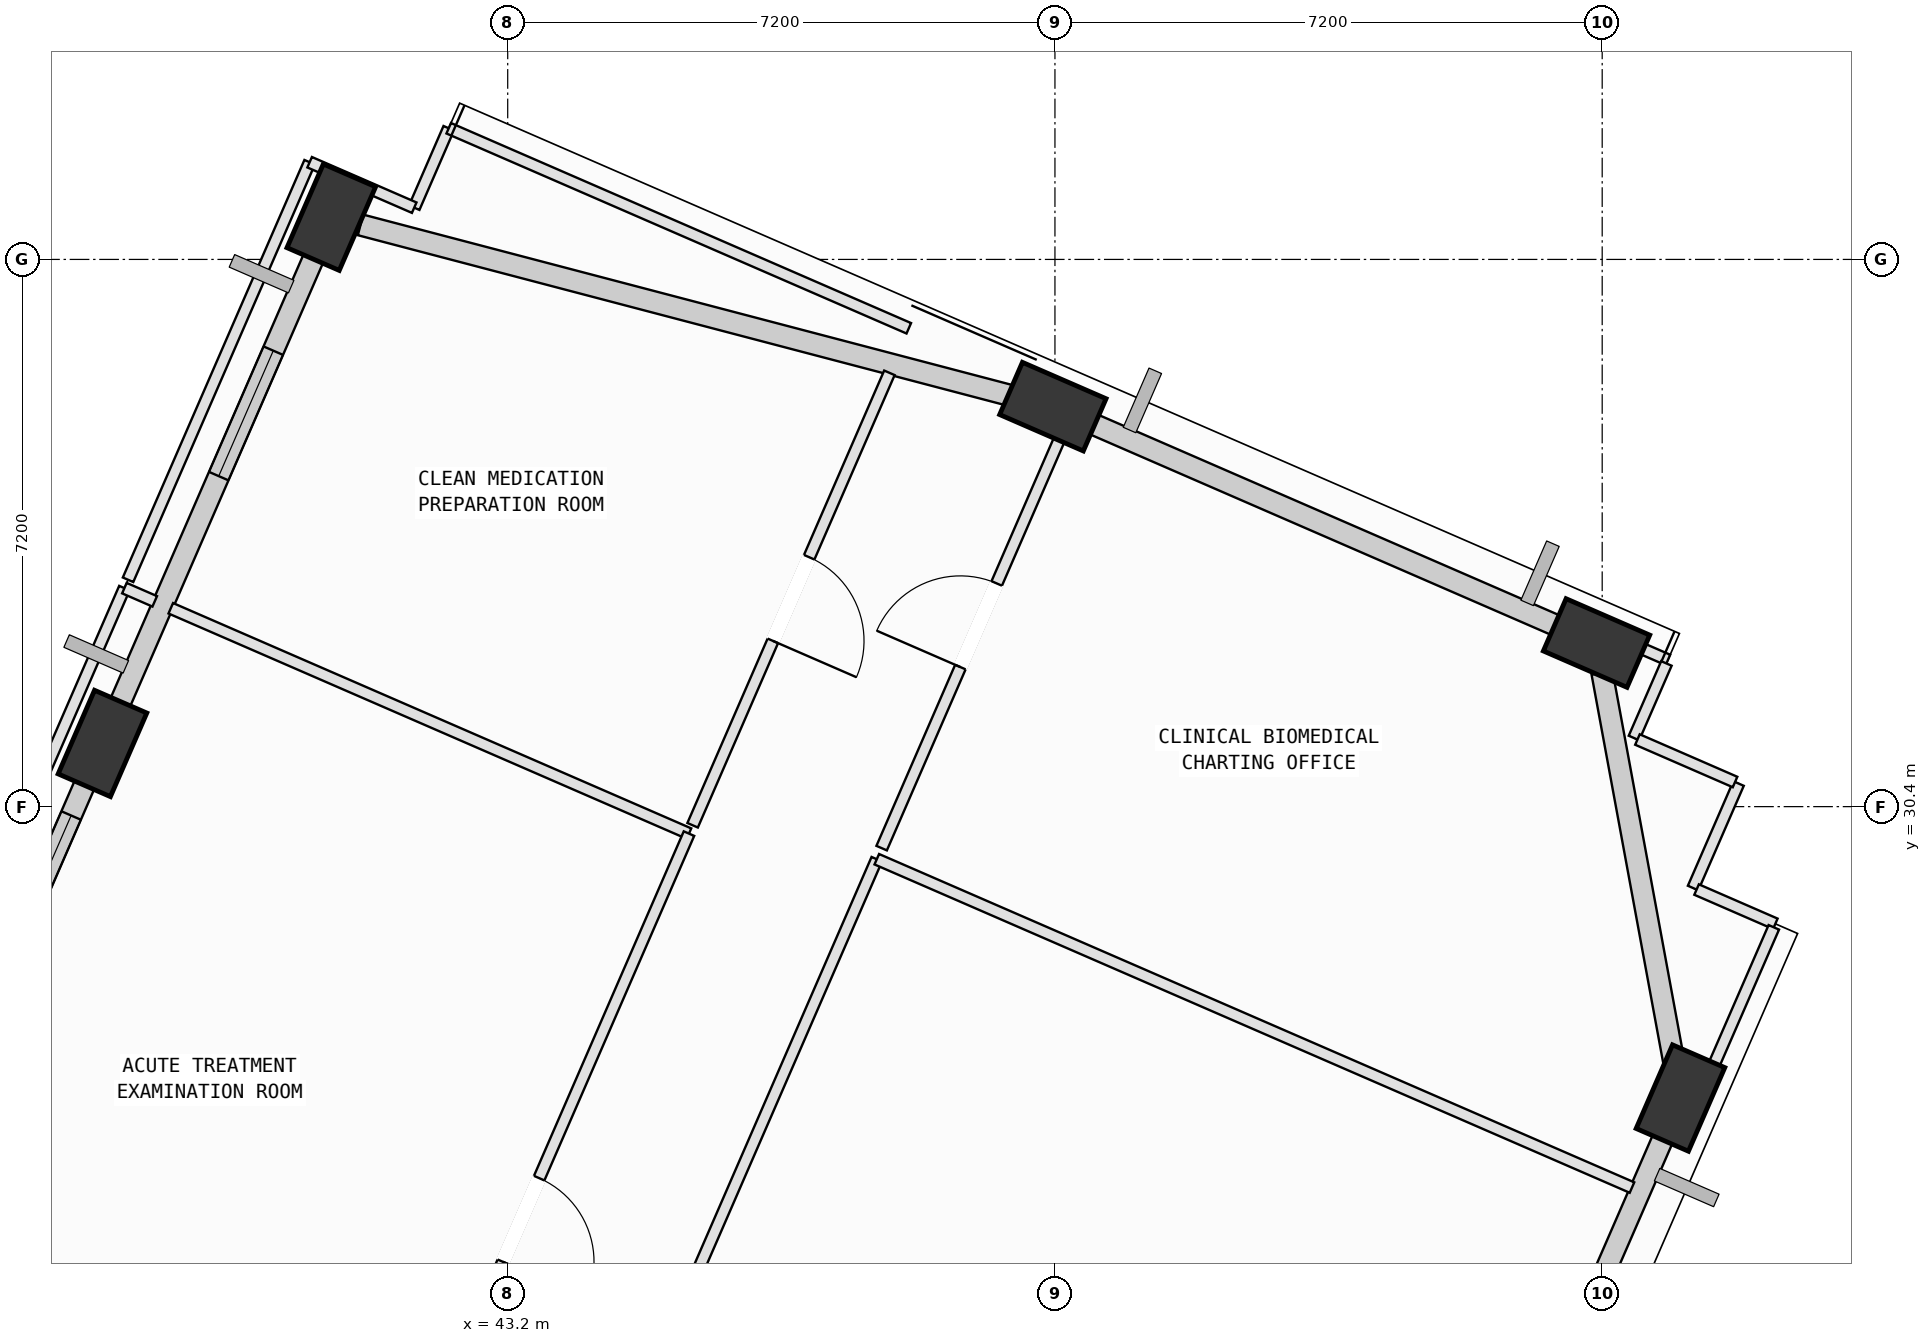
"""IFC4 building model, lengths in metres.
Left out: names, types, materials, properties, quantities, classifications, styles, units other than length and angle.
Written with IfcOpenShell. Run it as: python <this file> out.ifc"""

import sys

from ifc_helpers import new_model, si_unit, direction, frame, frame_2d, origin, origin_2d, place, context, subcontext, project, spatial, rectangle, extrude, element, fill, save


model = new_model("IFC4")
c1 = context("Model", 3, precision=1e-05, world=origin(), true_north=direction((0.0, 1.0)))
c2 = subcontext(c1, "Body", "Model", "MODEL_VIEW")
j1 = project(units=[si_unit("LENGTHUNIT", "METRE"), si_unit("PLANEANGLEUNIT", "RADIAN")], contexts=[c1])
p1 = place(None, origin())
s1 = spatial("IfcSite", under=j1, at=p1, CompositionType="ELEMENT")
p2 = place(p1, origin())
s2 = spatial("IfcBuilding", under=s1, at=p2, CompositionType="ELEMENT")
p3 = place(p2, frame((0.0, 0.0, 308.6)))
s3 = spatial("IfcBuildingStorey", under=s2, at=p3, CompositionType="ELEMENT", Elevation=308.6)
for number, where, z_axis, x_axis in (
    (1, (58.63, 26.566, 0.002), (0.0, 0.0, 1.0), (0.399, 0.917, 0.0)),
    (2, (57.526, 32.553, 0.002), (0.0, 0.0, 1.0), (-0.917, 0.399, 0.0)),
    (3, (50.373, 35.663, 0.002), (0.0, 0.0, 1.0), (-0.917, 0.399, 0.0)),
    (4, (40.879, 38.155, 0.002), (0.0, 0.0, 1.0), (0.399, 0.917, 0.0)),
    (5, (37.868, 31.231, 0.002), (0.0, 0.0, 1.0), (0.399, 0.917, 0.0)),
):
    element("IfcColumn", number, at=place(p3, frame(where, z_axis=z_axis, x_axis=x_axis)), inside=s3, PredefinedType="COLUMN", context=c2, shape_type="SweptSolid", body=[
        extrude(rectangle(XDim=1.2, YDim=0.75, at=origin_2d()), origin(), (0.0, 0.0, 1.0), 3.996),
    ])
p4 = place(p3, frame((58.472, 26.201, 0.0), z_axis=(0.0, 0.0, 1.0), x_axis=(-0.398776286617, -0.917048239316, 0.0)))
e6 = element("IfcWall", 6, at=p4, inside=s3, PredefinedType="SOLIDWALL", context=c2, shape_type="SweptSolid", body=[
    extrude(rectangle(XDim=6.405, YDim=0.28, at=frame_2d((3.203, 0.0))), origin(), (0.0, 0.0, 1.0), 3.265),
])
p5 = place(p4, frame((3.176, 0.0, 0.75)))
e7 = element("IfcOpeningElement", 7, at=p5, cuts=e6, PredefinedType="OPENING", context=c2, shape_type="SweptSolid", body=[
    extrude(rectangle(XDim=1.2, YDim=1.75, at=frame_2d((0.6, 0.875))), frame((0.0, 0.15, 0.0), z_axis=(0.0, -1.0, 0.0), x_axis=(1.0, 0.0, 0.0)), (0.0, 0.0, 1.0), 0.3),
])
p6 = place(p3, frame((57.598, 32.162, 0.0), z_axis=(0.0, 0.0, 1.0), x_axis=(0.181421889976, -0.983405357845, 0.0)))
e8 = element("IfcWall", 8, at=p6, inside=s3, PredefinedType="SOLIDWALL", context=c2, shape_type="SweptSolid", body=[
    extrude(rectangle(XDim=5.293, YDim=0.28, at=frame_2d((2.646, 0.0))), origin(), (0.0, 0.0, 1.0), 3.265),
])
p7 = place(p3, frame((50.737, 35.504, 0.0), z_axis=(0.0, 0.0, 1.0), x_axis=(0.917057311373, -0.398755423359, 0.0)))
e9 = element("IfcWall", 9, at=p7, inside=s3, PredefinedType="SOLIDWALL", context=c2, shape_type="SweptSolid", body=[
    extrude(rectangle(XDim=7.005, YDim=0.28, at=frame_2d((3.502, 0.0))), origin(), (0.0, 0.0, 1.0), 3.265),
])
p8 = place(p3, frame((41.264, 38.054, 0.0), z_axis=(0.0, 0.0, 1.0), x_axis=(0.967228971308, -0.253905724755, 0.0)))
e10 = element("IfcWall", 10, at=p8, inside=s3, PredefinedType="SOLIDWALL", context=c2, shape_type="SweptSolid", body=[
    extrude(rectangle(XDim=9.02, YDim=0.28, at=frame_2d((4.51, 0.0))), origin(), (0.0, 0.0, 1.0), 3.265),
])
p9 = place(p3, frame((38.027, 31.596, 0.0), z_axis=(0.0, 0.0, 1.0), x_axis=(0.398764437463, 0.917053391802, 0.0)))
e11 = element("IfcWall", 11, at=p9, inside=s3, PredefinedType="SOLIDWALL", context=c2, shape_type="SweptSolid", body=[
    extrude(rectangle(XDim=6.755, YDim=0.28, at=frame_2d((3.377, 0.0))), origin(), (0.0, 0.0, 1.0), 3.265),
])
p10 = place(p9, frame((3.438, 0.0, 0.75)))
e12 = element("IfcOpeningElement", 12, at=p10, cuts=e11, PredefinedType="OPENING", context=c2, shape_type="SweptSolid", body=[
    extrude(rectangle(XDim=1.8, YDim=2.05, at=frame_2d((0.9, 1.025))), frame((0.0, 0.15, 0.0), z_axis=(0.0, -1.0, 0.0), x_axis=(1.0, 0.0, 0.0)), (0.0, 0.0, 1.0), 0.3),
])
p11 = place(p3, frame((35.156, 24.993, 0.0), z_axis=(0.0, 0.0, 1.0), x_axis=(0.398758169539, 0.917056117272, 0.0)))
e13 = element("IfcWall", 13, at=p11, inside=s3, PredefinedType="SOLIDWALL", context=c2, shape_type="SweptSolid", body=[
    extrude(rectangle(XDim=6.405, YDim=0.28, at=frame_2d((3.202, 0.0))), origin(), (0.0, 0.0, 1.0), 3.265),
])
p12 = place(p11, frame((2.602, 0.0, 0.75)))
e14 = element("IfcOpeningElement", 14, at=p12, cuts=e13, PredefinedType="OPENING", context=c2, shape_type="SweptSolid", body=[
    extrude(rectangle(XDim=1.2, YDim=1.75, at=frame_2d((0.6, 0.875))), frame((0.0, 0.15, 0.0), z_axis=(0.0, -1.0, 0.0), x_axis=(1.0, 0.0, 0.0)), (0.0, 0.0, 1.0), 0.3),
])
p13 = place(p11, frame((4.569, 0.0, 0.75)))
e15 = element("IfcOpeningElement", 15, at=p13, cuts=e13, PredefinedType="OPENING", context=c2, shape_type="SweptSolid", body=[
    extrude(rectangle(XDim=1.2, YDim=1.75, at=frame_2d((0.6, 0.875))), frame((0.0, 0.15, 0.0), z_axis=(0.0, -1.0, 0.0), x_axis=(1.0, 0.0, 0.0)), (0.0, 0.0, 1.0), 0.3),
])
p14 = place(p3, frame((42.856, 17.749, 0.0), z_axis=(0.0, 0.0, 1.0), x_axis=(0.398751440491, 0.917059043195, 0.0)))
e16 = element("IfcWall", 16, at=p14, inside=s3, PredefinedType="PARTITIONING", context=c2, shape_type="SweptSolid", body=[
    extrude(rectangle(XDim=13.041, YDim=0.15, at=frame_2d((6.52, 0.0))), origin(), (0.0, 0.0, 1.0), 3.78),
])
p15 = place(p14, frame((5.92, 0.0, 0.0)))
e17 = element("IfcOpeningElement", 17, at=p15, cuts=e16, PredefinedType="OPENING", context=c2, shape_type="SweptSolid", body=[
    extrude(rectangle(XDim=1.2, YDim=2.15, at=frame_2d((0.6, 1.075))), frame((0.0, 0.085, 0.0), z_axis=(0.0, -1.0, 0.0), x_axis=(1.0, 0.0, 0.0)), (0.0, 0.0, 1.0), 0.17),
])
p16 = place(p3, frame((48.056, 29.708, 0.0), z_axis=(0.0, 0.0, 1.0), x_axis=(0.917068265028, -0.398730231207, 0.0)))
e18 = element("IfcWall", 18, at=p16, inside=s3, PredefinedType="PARTITIONING", context=c2, shape_type="SweptSolid", body=[
    extrude(rectangle(XDim=10.834, YDim=0.15, at=frame_2d((5.417, 0.0))), origin(), (0.0, 0.0, 1.0), 3.78),
])
p17 = place(p3, frame((59.394, 30.704, 0.0), z_axis=(0.0, 0.0, 1.0), x_axis=(-0.398904712107, -0.916992383097, 0.0)))
e19 = element("IfcWall", 19, at=p17, inside=s3, PredefinedType="PARTITIONING", context=c2, shape_type="SweptSolid", body=[
    extrude(rectangle(XDim=1.5, YDim=0.15, at=frame_2d((0.75, 0.0))), origin(), (0.0, 0.0, 1.0), 3.78),
])
p18 = place(p3, frame((58.842, 29.309, 0.0), z_axis=(0.0, 0.0, 1.0), x_axis=(0.916815661373, -0.399310709926, 0.0)))
e20 = element("IfcWall", 20, at=p18, inside=s3, PredefinedType="PARTITIONING", context=c2, shape_type="SweptSolid", body=[
    extrude(rectangle(XDim=1.13, YDim=0.15, at=frame_2d((0.565, 0.0))), origin(), (0.0, 0.0, 1.0), 3.78),
])
p19 = place(p3, frame((59.858, 28.812, 0.0), z_axis=(0.0, 0.0, 1.0), x_axis=(-0.399092651862, -0.916910603728, 0.0)))
e21 = element("IfcWall", 21, at=p19, inside=s3, PredefinedType="PARTITIONING", context=c2, shape_type="SweptSolid", body=[
    extrude(rectangle(XDim=2.947, YDim=0.15, at=frame_2d((1.473, 0.0))), origin(), (0.0, 0.0, 1.0), 3.265),
])
p20 = place(p3, frame((48.12, 29.854, 0.0), z_axis=(0.0, 0.0, 1.0), x_axis=(0.398700984872, 0.917080980428, 0.0)))
e22 = element("IfcWall", 22, at=p20, inside=s3, PredefinedType="PARTITIONING", context=c2, shape_type="SweptSolid", body=[
    extrude(rectangle(XDim=6.395, YDim=0.15, at=frame_2d((3.198, 0.0))), origin(), (0.0, 0.0, 1.0), 2.765),
])
p21 = place(p20, frame((2.598, 0.0, 0.0)))
e23 = element("IfcOpeningElement", 23, at=p21, cuts=e22, PredefinedType="OPENING", context=c2, shape_type="SweptSolid", body=[
    extrude(rectangle(XDim=1.2, YDim=2.15, at=frame_2d((0.6, 1.075))), frame((0.0, 0.085, 0.0), z_axis=(0.0, -1.0, 0.0), x_axis=(1.0, 0.0, 0.0)), (0.0, 0.0, 1.0), 0.17),
])
p22 = place(p3, frame((57.229, 32.867, 0.0), z_axis=(0.0, 0.0, 1.0), x_axis=(0.917222637379, -0.398374991032, 0.0)))
e24 = element("IfcWall", 24, at=p22, inside=s3, PredefinedType="PARTITIONING", context=c2, shape_type="SweptSolid", body=[
    extrude(rectangle(XDim=1.348, YDim=0.15, at=frame_2d((0.674, 0.0))), origin(), (0.0, 0.0, 1.0), 3.265),
])
p23 = place(p3, frame((58.445, 32.284, 0.0), z_axis=(0.0, 0.0, 1.0), x_axis=(-0.39911825621, -0.916899458807, 0.0)))
e25 = element("IfcWall", 25, at=p23, inside=s3, PredefinedType="PARTITIONING", context=c2, shape_type="SweptSolid", body=[
    extrude(rectangle(XDim=1.07, YDim=0.15, at=frame_2d((0.535, 0.0))), origin(), (0.0, 0.0, 1.0), 3.78),
])
p24 = place(p3, frame((58.064, 31.283, 0.0), z_axis=(0.0, 0.0, 1.0), x_axis=(0.91691198731, -0.399089473085, 0.0)))
e26 = element("IfcWall", 26, at=p24, inside=s3, PredefinedType="PARTITIONING", context=c2, shape_type="SweptSolid", body=[
    extrude(rectangle(XDim=1.4, YDim=0.15, at=frame_2d((0.7, 0.0))), origin(), (0.0, 0.0, 1.0), 3.78),
])
p25 = place(p3, frame((33.736, 23.108, 0.0), z_axis=(0.0, 0.0, 1.0), x_axis=(0.398761541239, 0.917054651168, 0.0)))
e27 = element("IfcWall", 27, at=p25, inside=s3, PredefinedType="PARTITIONING", context=c2, shape_type="SweptSolid", body=[
    extrude(rectangle(XDim=11.087, YDim=0.15, at=frame_2d((5.543, 0.0))), origin(), (0.0, 0.0, 1.0), 3.78),
])
p26 = place(p3, frame((38.157, 33.275, 0.0), z_axis=(0.0, 0.0, 1.0), x_axis=(0.916748651636, -0.399464528742, 0.0)))
e28 = element("IfcWall", 28, at=p26, inside=s3, PredefinedType="PARTITIONING", context=c2, shape_type="SweptSolid", body=[
    extrude(rectangle(XDim=0.435, YDim=0.15, at=frame_2d((0.218, 0.0))), origin(), (0.0, 0.0, 1.0), 3.78),
])
p27 = place(p3, frame((38.767, 33.01, 0.0), z_axis=(0.0, 0.0, 1.0), x_axis=(0.917030896956, -0.398816165707, 0.0)))
e29 = element("IfcWall", 29, at=p27, inside=s3, PredefinedType="PARTITIONING", context=c2, shape_type="SweptSolid", body=[
    extrude(rectangle(XDim=7.435, YDim=0.15, at=frame_2d((3.717, 0.0))), origin(), (0.0, 0.0, 1.0), 3.78),
])
p28 = place(p3, frame((45.585, 30.045, 0.0), z_axis=(0.0, 0.0, 1.0), x_axis=(-0.398687458661, -0.91708686083, 0.0)))
e30 = element("IfcWall", 30, at=p28, inside=s3, PredefinedType="PARTITIONING", context=c2, shape_type="SweptSolid", body=[
    extrude(rectangle(XDim=11.086, YDim=0.15, at=frame_2d((5.543, 0.0))), origin(), (0.0, 0.0, 1.0), 2.765),
])
p29 = place(p28, frame((4.943, 0.0, 0.0)))
e31 = element("IfcOpeningElement", 31, at=p29, cuts=e30, PredefinedType="OPENING", context=c2, shape_type="SweptSolid", body=[
    extrude(rectangle(XDim=1.2, YDim=2.15, at=frame_2d((0.6, 1.075))), frame((0.0, 0.085, 0.0), z_axis=(0.0, -1.0, 0.0), x_axis=(1.0, 0.0, 0.0)), (0.0, 0.0, 1.0), 0.17),
])
p30 = place(p3, frame((41.97, 38.281, 0.0), z_axis=(0.0, 0.0, 1.0), x_axis=(0.398569395059, 0.917138177878, 0.0)))
e32 = element("IfcWall", 32, at=p30, inside=s3, PredefinedType="PARTITIONING", context=c2, shape_type="SweptSolid", body=[
    extrude(rectangle(XDim=1.139, YDim=0.15, at=frame_2d((0.57, 0.0))), origin(), (0.0, 0.0, 1.0), 3.78),
])
p31 = place(p3, frame((42.424, 39.326, 0.0), z_axis=(0.0, 0.0, 1.0), x_axis=(0.917064175576, -0.3987396367, 0.0)))
e33 = element("IfcWall", 33, at=p31, inside=s3, PredefinedType="PARTITIONING", context=c2, shape_type="SweptSolid", body=[
    extrude(rectangle(XDim=6.6, YDim=0.15, at=frame_2d((3.3, 0.0))), origin(), (0.0, 0.0, 1.0), 3.78),
])
p32 = place(p3, frame((48.222, 36.108, 0.0), z_axis=(0.0, 0.0, 1.0), x_axis=(-0.398811373886, -0.9170329809, 0.0)))
e34 = element("IfcWall", 34, at=p32, inside=s3, PredefinedType="PARTITIONING", context=c2, shape_type="SweptSolid", body=[
    extrude(rectangle(XDim=6.491, YDim=0.15, at=frame_2d((3.246, 0.0))), origin(), (0.0, 0.0, 1.0), 2.765),
])
p33 = place(p32, frame((2.646, 0.0, 0.0)))
e35 = element("IfcOpeningElement", 35, at=p33, cuts=e34, PredefinedType="OPENING", context=c2, shape_type="SweptSolid", body=[
    extrude(rectangle(XDim=1.2, YDim=2.15, at=frame_2d((0.6, 1.075))), frame((0.0, 0.085, 0.0), z_axis=(0.0, -1.0, 0.0), x_axis=(1.0, 0.0, 0.0)), (0.0, 0.0, 1.0), 0.17),
])
p34 = place(p3, frame((38.205, 33.385, 0.0), z_axis=(0.0, 0.0, 1.0), x_axis=(0.398763364975, 0.917053858153, 0.0)))
e36 = element("IfcWall", 36, at=p34, inside=s3, PredefinedType="PARTITIONING", context=c2, shape_type="SweptSolid", body=[
    extrude(rectangle(XDim=5.991, YDim=0.15, at=frame_2d((2.995, 0.0))), origin(), (0.0, 0.0, 1.0), 3.78),
])
p35 = place(p3, frame((40.594, 38.879, 0.0), z_axis=(0.0, 0.0, 1.0), x_axis=(0.91715541112, -0.398529737728, 0.0)))
e37 = element("IfcWall", 37, at=p35, inside=s3, PredefinedType="PARTITIONING", context=c2, shape_type="SweptSolid", body=[
    extrude(rectangle(XDim=1.5, YDim=0.15, at=frame_2d((0.75, 0.0))), origin(), (0.0, 0.0, 1.0), 3.265),
])
p36 = place(p10, origin())
e38 = element("IfcWindow", 38, at=p36, inside=s3, PartitioningType="SINGLE_PANEL", PredefinedType="WINDOW", context=c2, shape_type="SweptSolid", body=[
    extrude(rectangle(XDim=1.8, YDim=2.05, at=frame_2d((0.9, 1.025))), frame((0.0, 0.03, 0.0), z_axis=(0.0, -1.0, 0.0), x_axis=(1.0, 0.0, 0.0)), (0.0, 0.0, 1.0), 0.06),
])
fill(e12, e38)
p37 = place(p13, origin())
e39 = element("IfcWindow", 39, at=p37, inside=s3, PartitioningType="SINGLE_PANEL", PredefinedType="WINDOW", context=c2, shape_type="SweptSolid", body=[
    extrude(rectangle(XDim=1.2, YDim=1.75, at=frame_2d((0.6, 0.875))), frame((0.0, 0.03, 0.0), z_axis=(0.0, -1.0, 0.0), x_axis=(1.0, 0.0, 0.0)), (0.0, 0.0, 1.0), 0.06),
])
fill(e15, e39)
p38 = place(p21, origin())
e40 = element("IfcDoor", 40, at=p38, inside=s3, OperationType="SINGLE_SWING_LEFT", PredefinedType="DOOR", context=c2, shape_type="SweptSolid", body=[
    extrude(rectangle(XDim=1.2, YDim=2.15, at=frame_2d((0.6, 1.075))), frame((0.0, 0.025, 0.0), z_axis=(0.0, -1.0, 0.0), x_axis=(1.0, 0.0, 0.0)), (0.0, 0.0, 1.0), 0.05),
])
fill(e23, e40)
p39 = place(p29, origin())
e41 = element("IfcDoor", 41, at=p39, inside=s3, OperationType="SINGLE_SWING_RIGHT", PredefinedType="DOOR", context=c2, shape_type="SweptSolid", body=[
    extrude(rectangle(XDim=1.2, YDim=2.15, at=frame_2d((0.6, 1.075))), frame((0.0, 0.025, 0.0), z_axis=(0.0, -1.0, 0.0), x_axis=(1.0, 0.0, 0.0)), (0.0, 0.0, 1.0), 0.05),
])
fill(e31, e41)
p40 = place(p33, origin())
e42 = element("IfcDoor", 42, at=p40, inside=s3, OperationType="SINGLE_SWING_RIGHT", PredefinedType="DOOR", context=c2, shape_type="SweptSolid", body=[
    extrude(rectangle(XDim=1.2, YDim=2.15, at=frame_2d((0.6, 1.075))), frame((0.0, 0.025, 0.0), z_axis=(0.0, -1.0, 0.0), x_axis=(1.0, 0.0, 0.0)), (0.0, 0.0, 1.0), 0.05),
])
fill(e35, e42)
save(model, sys.argv[1])
